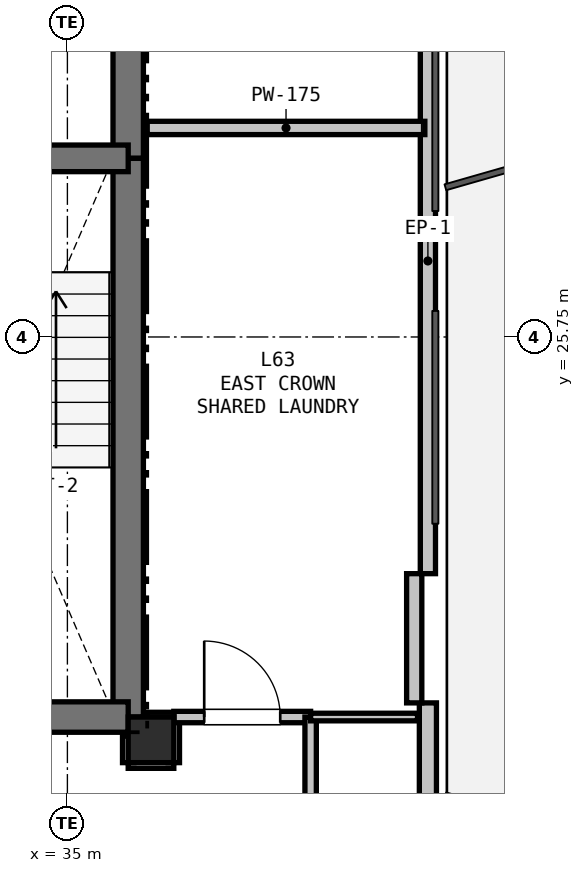
"""IFC4 building model, lengths in metres.
Left out: names, types, materials, properties, quantities, classifications, styles, units other than length and angle.
Written with IfcOpenShell. Run it as: python <this file> out.ifc"""

import sys

from ifc_helpers import new_model, si_unit, direction, frame, frame_2d, origin, origin_2d, place, context, subcontext, project, spatial, rectangle, extrude, element, fill, save


model = new_model("IFC4")
c1 = context("Model", 3, precision=1e-05, world=origin(), true_north=direction((0.0, 1.0)))
c2 = subcontext(c1, "Body", "Model", "MODEL_VIEW")
j1 = project(units=[si_unit("LENGTHUNIT", "METRE"), si_unit("PLANEANGLEUNIT", "RADIAN")], contexts=[c1])
p1 = place(None, origin())
s1 = spatial("IfcSite", under=j1, at=p1, CompositionType="ELEMENT")
p2 = place(p1, origin())
s2 = spatial("IfcBuilding", under=s1, at=p2, CompositionType="ELEMENT")
p3 = place(p2, frame((0.0, 0.0, 226.5)))
s3 = spatial("IfcBuildingStorey", under=s2, at=p3, CompositionType="ELEMENT", Elevation=226.5)
p4 = place(p3, frame((36.1, 20.45, 0.0), z_axis=(0.0, 0.0, 1.0), x_axis=(1.0, 0.0, 0.0)))
e1 = element("IfcColumn", 1, at=p4, inside=s3, PredefinedType="COLUMN", context=c2, shape_type="SweptSolid", body=[
    extrude(rectangle(XDim=0.6, YDim=0.6, at=origin_2d()), origin(), (0.0, 0.0, 1.0), 3.3),
])
p5 = place(p3, frame((39.743, 30.864, 0.0), z_axis=(0.0, 0.0, 1.0), x_axis=(0.0, -1.0, 0.0)))
e2 = element("IfcWall", 2, at=p5, inside=s3, PredefinedType="PARAPET", context=c2, shape_type="SweptSolid", body=[
    extrude(rectangle(XDim=8.228, YDim=0.2, at=frame_2d((4.114, 0.0))), origin(), (0.0, 0.0, 1.0), 0.2),
])
p6 = place(p3, frame((39.743, 20.936, 0.0), z_axis=(0.0, 0.0, 1.0), x_axis=(0.0, -1.0, 0.0)))
e3 = element("IfcWall", 3, at=p6, inside=s3, PredefinedType="SOLIDWALL", context=c2, shape_type="SweptSolid", body=[
    extrude(rectangle(XDim=8.928, YDim=0.225, at=frame_2d((4.464, 0.0))), origin(), (0.0, 0.0, 1.0), 2.7),
])
p7 = place(p6, frame((6.322, 0.0, 0.9)))
e4 = element("IfcOpeningElement", 4, at=p7, cuts=e3, PredefinedType="OPENING", context=c2, shape_type="SweptSolid", body=[
    extrude(rectangle(XDim=1.2, YDim=1.4, at=frame_2d((0.6, 0.7))), frame((0.0, 0.123, 0.0), z_axis=(0.0, -1.0, 0.0), x_axis=(1.0, 0.0, 0.0)), (0.0, 0.0, 1.0), 0.245),
])
p8 = place(p3, frame((39.563, 22.636, 0.0), z_axis=(0.0, 0.0, 1.0), x_axis=(0.0, -1.0, 0.0)))
e5 = element("IfcWall", 5, at=p8, inside=s3, PredefinedType="PARAPET", context=c2, shape_type="SweptSolid", body=[
    extrude(rectangle(XDim=1.7, YDim=0.2, at=frame_2d((0.85, 0.0))), origin(), (0.0, 0.0, 1.0), 2.7),
])
p9 = place(p3, frame((35.8, 32.75, 0.0), z_axis=(0.0, 0.0, 1.0), x_axis=(0.0, -1.0, 0.0)))
e6 = element("IfcWall", 6, at=p9, inside=s3, PredefinedType="SHEAR", context=c2, shape_type="SweptSolid", body=[
    extrude(rectangle(XDim=4.65, YDim=0.4, at=frame_2d((2.325, 0.0))), origin(), (0.0, 0.0, 1.0), 3.08),
])
p10 = place(p3, frame((35.8, 28.1, 0.0), z_axis=(0.0, 0.0, 1.0), x_axis=(0.0, -1.0, 0.0)))
e7 = element("IfcWall", 7, at=p10, inside=s3, PredefinedType="SHEAR", context=c2, shape_type="SweptSolid", body=[
    extrude(rectangle(XDim=7.35, YDim=0.4, at=frame_2d((3.675, 0.0))), origin(), (0.0, 0.0, 1.0), 3.08),
])
p11 = place(p3, frame((35.8, 20.75, 0.0), z_axis=(0.0, 0.0, 1.0), x_axis=(-1.0, 0.0, 0.0)))
e8 = element("IfcWall", 8, at=p11, inside=s3, PredefinedType="SHEAR", context=c2, shape_type="SweptSolid", body=[
    extrude(rectangle(XDim=3.45, YDim=0.4, at=frame_2d((1.725, 0.0))), origin(), (0.0, 0.0, 1.0), 3.08),
])
p12 = place(p3, frame((32.35, 28.1, 0.0), z_axis=(0.0, 0.0, 1.0), x_axis=(1.0, 0.0, 0.0)))
e9 = element("IfcWall", 9, at=p12, inside=s3, PredefinedType="SHEAR", context=c2, shape_type="SweptSolid", body=[
    extrude(rectangle(XDim=3.45, YDim=0.35, at=frame_2d((1.725, 0.0))), origin(), (0.0, 0.0, 1.0), 3.08),
])
p13 = place(p12, frame((1.15, 0.0, 0.0)))
e10 = element("IfcOpeningElement", 10, at=p13, cuts=e9, PredefinedType="OPENING", context=c2, shape_type="SweptSolid", body=[
    extrude(rectangle(XDim=1.15, YDim=2.15, at=frame_2d((0.575, 1.075))), frame((0.0, 0.185, 0.0), z_axis=(0.0, -1.0, 0.0), x_axis=(1.0, 0.0, 0.0)), (0.0, 0.0, 1.0), 0.37),
])
p14 = place(p3, frame((35.8, 20.15, 0.0), z_axis=(0.0, 0.0, 1.0), x_axis=(1.0, 0.0, 0.0)))
e11 = element("IfcWall", 11, at=p14, inside=s3, PredefinedType="PARTITIONING", context=c2, shape_type="SweptSolid", body=[
    extrude(rectangle(XDim=0.6, YDim=0.15, at=frame_2d((0.3, 0.0))), origin(), (0.0, 0.0, 1.0), 2.528),
])
p15 = place(p3, frame((36.4, 20.15, 0.0), z_axis=(0.0, 0.0, 1.0), x_axis=(0.0, 1.0, 0.0)))
e12 = element("IfcWall", 12, at=p15, inside=s3, PredefinedType="PARTITIONING", context=c2, shape_type="SweptSolid", body=[
    extrude(rectangle(XDim=0.6, YDim=0.15, at=frame_2d((0.3, 0.0))), origin(), (0.0, 0.0, 1.0), 3.08),
])
p16 = place(p3, frame((36.4, 20.75, 0.0), z_axis=(0.0, 0.0, 1.0), x_axis=(1.0, 0.0, 0.0)))
e13 = element("IfcWall", 13, at=p16, inside=s3, PredefinedType="PARTITIONING", context=c2, shape_type="SweptSolid", body=[
    extrude(rectangle(XDim=1.8, YDim=0.15, at=frame_2d((0.9, 0.0))), origin(), (0.0, 0.0, 1.0), 3.08),
])
p17 = place(p16, frame((0.4, 0.0, 0.0)))
e14 = element("IfcOpeningElement", 14, at=p17, cuts=e13, PredefinedType="OPENING", context=c2, shape_type="SweptSolid", body=[
    extrude(rectangle(XDim=1.0, YDim=2.15, at=frame_2d((0.5, 1.075))), frame((0.0, 0.085, 0.0), z_axis=(0.0, -1.0, 0.0), x_axis=(1.0, 0.0, 0.0)), (0.0, 0.0, 1.0), 0.17),
])
p18 = place(p3, frame((38.2, 20.75, 0.0), z_axis=(0.0, 0.0, 1.0), x_axis=(0.0, -1.0, 0.0)))
e15 = element("IfcWall", 15, at=p18, inside=s3, PredefinedType="PARTITIONING", context=c2, shape_type="SweptSolid", body=[
    extrude(rectangle(XDim=2.45, YDim=0.15, at=frame_2d((1.225, 0.0))), origin(), (0.0, 0.0, 1.0), 3.08),
])
p19 = place(p3, frame((35.8, 20.5, 0.0), z_axis=(0.0, 0.0, 1.0), x_axis=(0.0, -1.0, 0.0)))
e16 = element("IfcWall", 16, at=p19, inside=s3, PredefinedType="PARTITIONING", context=c2, shape_type="SweptSolid", body=[
    extrude(rectangle(XDim=0.35, YDim=0.15, at=frame_2d((0.175, 0.0))), origin(), (0.0, 0.0, 1.0), 2.605),
])
p20 = place(p3, frame((39.703, 28.5, 0.0), z_axis=(0.0, 0.0, 1.0), x_axis=(-1.0, 0.0, 0.0)))
e17 = element("IfcWall", 17, at=p20, inside=s3, PredefinedType="PLUMBINGWALL", context=c2, shape_type="SweptSolid", body=[
    extrude(rectangle(XDim=3.653, YDim=0.175, at=frame_2d((1.826, 0.0))), origin(), (0.0, 0.0, 1.0), 2.365),
])
p21 = place(p3, frame((39.606, 20.75, 0.0), z_axis=(0.0, 0.0, 1.0), x_axis=(-1.0, 0.0, 0.0)))
e18 = element("IfcWall", 18, at=p21, inside=s3, PredefinedType="PARTITIONING", context=c2, shape_type="SweptSolid", body=[
    extrude(rectangle(XDim=1.406, YDim=0.1, at=frame_2d((0.703, 0.0))), origin(), (0.0, 0.0, 1.0), 2.365),
])
p22 = place(p3, frame((36.4, 20.75, 0.0), z_axis=(0.0, 0.0, 1.0), x_axis=(-1.0, 0.0, 0.0)))
e19 = element("IfcWall", 19, at=p22, inside=s3, PredefinedType="PARTITIONING", context=c2, shape_type="SweptSolid", body=[
    extrude(rectangle(XDim=0.35, YDim=0.125, at=frame_2d((0.175, 0.0))), origin(), (0.0, 0.0, 1.0), 2.605),
])
p23 = place(p17, origin())
e20 = element("IfcDoor", 20, at=p23, inside=s3, OperationType="SINGLE_SWING_LEFT", PredefinedType="DOOR", context=c2, shape_type="SweptSolid", body=[
    extrude(rectangle(XDim=1.0, YDim=2.15, at=frame_2d((0.5, 1.075))), frame((0.0, 0.025, 0.0), z_axis=(0.0, -1.0, 0.0), x_axis=(1.0, 0.0, 0.0)), (0.0, 0.0, 1.0), 0.05),
])
fill(e14, e20)
save(model, sys.argv[1])
